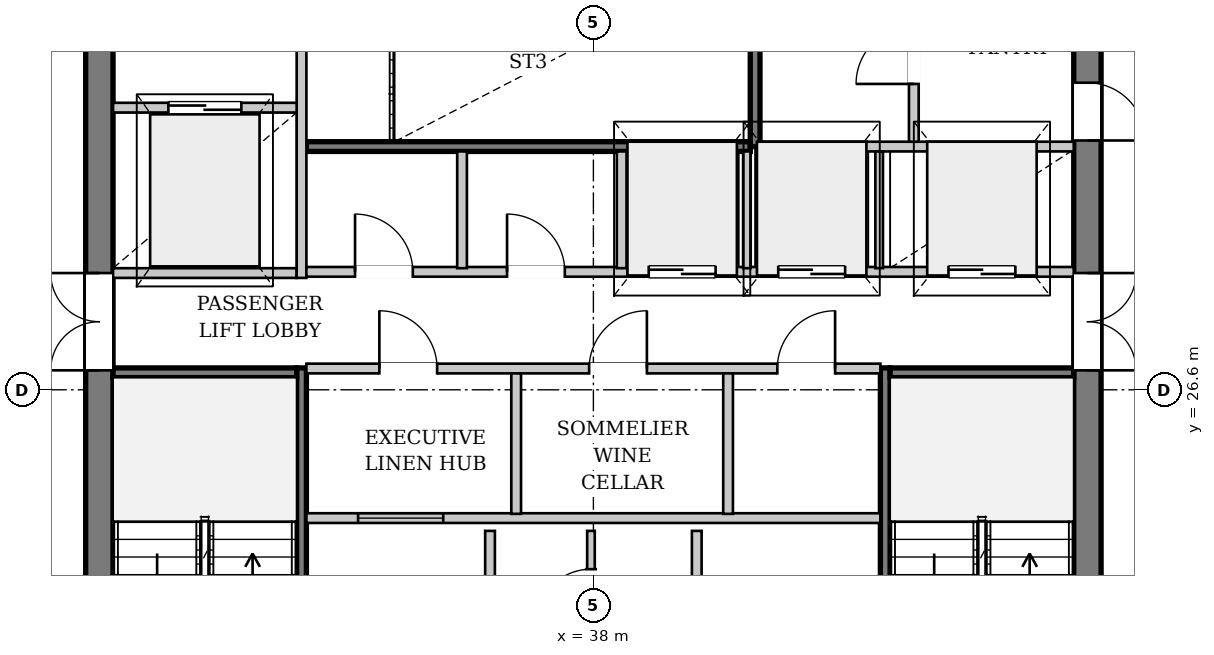
"""IFC4 building model, lengths in metres.
Left out: names, types, materials, properties, quantities, classifications, styles, units other than length and angle.
Written with IfcOpenShell. Run it as: python <this file> out.ifc"""

import sys

from ifc_helpers import new_model, si_unit, direction, frame, frame_2d, origin, place, context, subcontext, project, spatial, rectangle, extrude, source, transform, mapped, element, fill, save


model = new_model("IFC4")
c1 = context("Model", 3, precision=1e-05, world=origin(), true_north=direction((0.0, 1.0)))
c2 = subcontext(c1, "Body", "Model", "MODEL_VIEW")
j1 = project(units=[si_unit("LENGTHUNIT", "METRE"), si_unit("PLANEANGLEUNIT", "RADIAN")], contexts=[c1])
p1 = place(None, origin())
s1 = spatial("IfcSite", under=j1, at=p1, CompositionType="ELEMENT")
p2 = place(p1, origin())
s2 = spatial("IfcBuilding", under=s1, at=p2, CompositionType="ELEMENT")
p3 = place(p2, frame((0.0, 0.0, 290.5)))
s3 = spatial("IfcBuildingStorey", under=s2, at=p3, CompositionType="ELEMENT", Elevation=290.5)
p4 = place(p3, frame((29.875, 19.5, 0.0), z_axis=(0.0, 0.0, 1.0), x_axis=(0.0, 1.0, 0.0)))
e1 = element("IfcWall", 1, at=p4, inside=s3, PredefinedType="SHEAR", context=c2, shape_type="SweptSolid", body=[
    extrude(rectangle(XDim=14.2, YDim=0.45, at=frame_2d((7.1, 0.0))), origin(), (0.0, 0.0, 1.0), 4.24),
])
p5 = place(p4, frame((7.42, 0.0, 0.0)))
e2 = element("IfcOpeningElement", 2, at=p5, cuts=e1, PredefinedType="OPENING", context=c2, shape_type="SweptSolid", body=[
    extrude(rectangle(XDim=1.6, YDim=2.2, at=frame_2d((0.8, 1.1))), frame((0.0, 0.235, 0.0), z_axis=(0.0, -1.0, 0.0), x_axis=(1.0, 0.0, 0.0)), (0.0, 0.0, 1.0), 0.47),
])
p6 = place(p3, frame((46.125, 33.7, 0.0), z_axis=(0.0, 0.0, 1.0), x_axis=(0.0, -1.0, 0.0)))
e3 = element("IfcWall", 3, at=p6, inside=s3, PredefinedType="SHEAR", context=c2, shape_type="SweptSolid", body=[
    extrude(rectangle(XDim=14.2, YDim=0.45, at=frame_2d((7.1, 0.0))), origin(), (0.0, 0.0, 1.0), 4.24),
])
p7 = place(p6, frame((5.18, 0.0, 0.0)))
e4 = element("IfcOpeningElement", 4, at=p7, cuts=e3, PredefinedType="OPENING", context=c2, shape_type="SweptSolid", body=[
    extrude(rectangle(XDim=1.6, YDim=2.2, at=frame_2d((0.8, 1.1))), frame((0.0, 0.235, 0.0), z_axis=(0.0, -1.0, 0.0), x_axis=(1.0, 0.0, 0.0)), (0.0, 0.0, 1.0), 0.47),
])
p8 = place(p6, frame((2.05, 0.0, 0.0)))
e5 = element("IfcOpeningElement", 5, at=p8, cuts=e3, PredefinedType="OPENING", context=c2, shape_type="SweptSolid", body=[
    extrude(rectangle(XDim=0.95, YDim=2.1, at=frame_2d((0.475, 1.05))), frame((0.0, 0.235, 0.0), z_axis=(0.0, -1.0, 0.0), x_axis=(1.0, 0.0, 0.0)), (0.0, 0.0, 1.0), 0.47),
])
p9 = place(p3, frame((33.2, 19.5, 0.0), z_axis=(0.0, 0.0, 1.0), x_axis=(0.0, 1.0, 0.0)))
e6 = element("IfcWall", 6, at=p9, inside=s3, PredefinedType="PARTITIONING", context=c2, shape_type="SweptSolid", body=[
    extrude(rectangle(XDim=7.46, YDim=0.16, at=frame_2d((3.73, 0.0))), origin(), (0.0, 0.0, 1.0), 4.24),
])
p10 = place(p9, frame((0.08, 0.0, 0.0)))
e7 = element("IfcOpeningElement", 7, at=p10, cuts=e6, PredefinedType="OPENING", context=c2, shape_type="SweptSolid", body=[
    extrude(rectangle(XDim=1.32, YDim=2.2, at=frame_2d((0.66, 1.1))), frame((0.0, 0.09, 0.0), z_axis=(0.0, -1.0, 0.0), x_axis=(1.0, 0.0, 0.0)), (0.0, 0.0, 1.0), 0.18),
])
p11 = place(p3, frame((30.1, 26.88, 0.0), z_axis=(0.0, 0.0, 1.0), x_axis=(1.0, 0.0, 0.0)))
e8 = element("IfcWall", 8, at=p11, inside=s3, PredefinedType="PARTITIONING", context=c2, shape_type="SweptSolid", body=[
    extrude(rectangle(XDim=3.02, YDim=0.16, at=frame_2d((1.51, 0.0))), origin(), (0.0, 0.0, 1.0), 4.24),
])
p12 = place(p3, frame((42.8, 26.96, 0.0), z_axis=(0.0, 0.0, 1.0), x_axis=(0.0, -1.0, 0.0)))
e9 = element("IfcWall", 9, at=p12, inside=s3, PredefinedType="PARTITIONING", context=c2, shape_type="SweptSolid", body=[
    extrude(rectangle(XDim=7.46, YDim=0.16, at=frame_2d((3.73, 0.0))), origin(), (0.0, 0.0, 1.0), 4.24),
])
p13 = place(p12, frame((6.06, 0.0, 0.0)))
e10 = element("IfcOpeningElement", 10, at=p13, cuts=e9, PredefinedType="OPENING", context=c2, shape_type="SweptSolid", body=[
    extrude(rectangle(XDim=1.32, YDim=2.2, at=frame_2d((0.66, 1.1))), frame((0.0, 0.09, 0.0), z_axis=(0.0, -1.0, 0.0), x_axis=(1.0, 0.0, 0.0)), (0.0, 0.0, 1.0), 0.18),
])
p14 = place(p3, frame((42.88, 26.88, 0.0), z_axis=(0.0, 0.0, 1.0), x_axis=(1.0, 0.0, 0.0)))
e11 = element("IfcWall", 11, at=p14, inside=s3, PredefinedType="PARTITIONING", context=c2, shape_type="SweptSolid", body=[
    extrude(rectangle(XDim=3.02, YDim=0.16, at=frame_2d((1.51, 0.0))), origin(), (0.0, 0.0, 1.0), 4.24),
])
p15 = place(p3, frame((33.28, 30.6, 0.0), z_axis=(0.0, 0.0, 1.0), x_axis=(1.0, 0.0, 0.0)))
e12 = element("IfcWall", 12, at=p15, inside=s3, PredefinedType="PARTITIONING", context=c2, shape_type="SweptSolid", body=[
    extrude(rectangle(XDim=7.3, YDim=0.16, at=frame_2d((3.65, 0.0))), origin(), (0.0, 0.0, 1.0), 4.24),
])
p16 = place(p3, frame((40.66, 30.6, 0.0), z_axis=(0.0, 0.0, 1.0), x_axis=(0.0, 1.0, 0.0)))
e13 = element("IfcWall", 13, at=p16, inside=s3, PredefinedType="PARTITIONING", context=c2, shape_type="SweptSolid", body=[
    extrude(rectangle(XDim=3.1, YDim=0.16, at=frame_2d((1.55, 0.0))), origin(), (0.0, 0.0, 1.0), 4.24),
])
p17 = place(p3, frame((36.3, 19.5, 0.0), z_axis=(0.0, 0.0, 1.0), x_axis=(0.0, 1.0, 0.0)))
e14 = element("IfcWall", 14, at=p17, inside=s3, PredefinedType="PARTITIONING", context=c2, shape_type="SweptSolid", body=[
    extrude(rectangle(XDim=4.78, YDim=0.16, at=frame_2d((2.39, 0.0))), origin(), (0.0, 0.0, 1.0), 4.24),
])
p18 = place(p17, frame((0.6, 0.0, 0.0)))
e15 = element("IfcOpeningElement", 15, at=p18, cuts=e14, PredefinedType="OPENING", context=c2, shape_type="SweptSolid", body=[
    extrude(rectangle(XDim=1.2, YDim=2.2, at=frame_2d((0.6, 1.1))), frame((0.0, 0.09, 0.0), z_axis=(0.0, -1.0, 0.0), x_axis=(1.0, 0.0, 0.0)), (0.0, 0.0, 1.0), 0.18),
])
p19 = place(p17, frame((2.65, 0.0, 0.0)))
e16 = element("IfcOpeningElement", 16, at=p19, cuts=e14, PredefinedType="OPENING", context=c2, shape_type="SweptSolid", body=[
    extrude(rectangle(XDim=0.95, YDim=2.1, at=frame_2d((0.475, 1.05))), frame((0.0, 0.09, 0.0), z_axis=(0.0, -1.0, 0.0), x_axis=(1.0, 0.0, 0.0)), (0.0, 0.0, 1.0), 0.18),
])
p20 = place(p3, frame((39.7, 24.28, 0.0), z_axis=(0.0, 0.0, 1.0), x_axis=(0.0, -1.0, 0.0)))
e17 = element("IfcWall", 17, at=p20, inside=s3, PredefinedType="PARTITIONING", context=c2, shape_type="SweptSolid", body=[
    extrude(rectangle(XDim=4.78, YDim=0.16, at=frame_2d((2.39, 0.0))), origin(), (0.0, 0.0, 1.0), 4.24),
])
p21 = place(p20, frame((3.12, 0.0, 0.0)))
e18 = element("IfcOpeningElement", 18, at=p21, cuts=e17, PredefinedType="OPENING", context=c2, shape_type="SweptSolid", body=[
    extrude(rectangle(XDim=1.2, YDim=2.2, at=frame_2d((0.6, 1.1))), frame((0.0, 0.09, 0.0), z_axis=(0.0, -1.0, 0.0), x_axis=(1.0, 0.0, 0.0)), (0.0, 0.0, 1.0), 0.18),
])
p22 = place(p3, frame((33.28, 24.49, 0.0), z_axis=(0.0, 0.0, 1.0), x_axis=(1.0, 0.0, 0.0)))
e19 = element("IfcWall", 19, at=p22, inside=s3, PredefinedType="PARTITIONING", context=c2, shape_type="SweptSolid", body=[
    extrude(rectangle(XDim=9.44, YDim=0.16, at=frame_2d((4.72, 0.0))), origin(), (0.0, 0.0, 1.0), 4.24),
])
p23 = place(p22, frame((0.85, 0.0, 0.95)))
e20 = element("IfcOpeningElement", 20, at=p23, cuts=e19, PredefinedType="OPENING", context=c2, shape_type="SweptSolid", body=[
    extrude(rectangle(XDim=1.4, YDim=1.8, at=frame_2d((0.7, 0.9))), frame((0.0, 0.09, 0.0), z_axis=(0.0, -1.0, 0.0), x_axis=(1.0, 0.0, 0.0)), (0.0, 0.0, 1.0), 0.18),
])
p24 = place(p3, frame((37.96, 22.1, 0.0), z_axis=(0.0, 0.0, 1.0), x_axis=(0.0, 1.0, 0.0)))
e21 = element("IfcWall", 21, at=p24, inside=s3, PredefinedType="PARTITIONING", context=c2, shape_type="SweptSolid", body=[
    extrude(rectangle(XDim=2.18, YDim=0.125, at=frame_2d((1.09, 0.0))), origin(), (0.0, 0.0, 1.0), 4.24),
])
p25 = place(p24, frame((0.65, 0.0, 0.0)))
e22 = element("IfcOpeningElement", 22, at=p25, cuts=e21, PredefinedType="OPENING", context=c2, shape_type="SweptSolid", body=[
    extrude(rectangle(XDim=0.9, YDim=2.1, at=frame_2d((0.45, 1.05))), frame((0.0, 0.073, 0.0), z_axis=(0.0, -1.0, 0.0), x_axis=(1.0, 0.0, 0.0)), (0.0, 0.0, 1.0), 0.145),
])
p26 = place(p3, frame((30.1, 28.52, 0.0), z_axis=(0.0, 0.0, 1.0), x_axis=(1.0, 0.0, 0.0)))
e23 = element("IfcWall", 23, at=p26, inside=s3, PredefinedType="PARTITIONING", context=c2, shape_type="SweptSolid", body=[
    extrude(rectangle(XDim=3.02, YDim=0.16, at=frame_2d((1.51, 0.0))), origin(), (0.0, 0.0, 1.0), 4.24),
])
p27 = place(p3, frame((33.2, 28.44, 0.0), z_axis=(0.0, 0.0, 1.0), x_axis=(0.0, 1.0, 0.0)))
e24 = element("IfcWall", 24, at=p27, inside=s3, PredefinedType="PARTITIONING", context=c2, shape_type="SweptSolid", body=[
    extrude(rectangle(XDim=5.26, YDim=0.16, at=frame_2d((2.63, 0.0))), origin(), (0.0, 0.0, 1.0), 4.24),
])
p28 = place(p3, frame((30.1, 31.24, 0.0), z_axis=(0.0, 0.0, 1.0), x_axis=(1.0, 0.0, 0.0)))
e25 = element("IfcWall", 25, at=p28, inside=s3, PredefinedType="PARTITIONING", context=c2, shape_type="SweptSolid", body=[
    extrude(rectangle(XDim=3.02, YDim=0.16, at=frame_2d((1.51, 0.0))), origin(), (0.0, 0.0, 1.0), 4.24),
])
p29 = place(p28, frame((0.91, 0.0, 0.0)))
e26 = element("IfcOpeningElement", 26, at=p29, cuts=e25, PredefinedType="OPENING", context=c2, shape_type="SweptSolid", body=[
    extrude(rectangle(XDim=1.2, YDim=2.2, at=frame_2d((0.6, 1.1))), frame((0.0, 0.09, 0.0), z_axis=(0.0, -1.0, 0.0), x_axis=(1.0, 0.0, 0.0)), (0.0, 0.0, 1.0), 0.18),
])
p30 = place(p3, frame((33.28, 26.95, 0.0), z_axis=(0.0, 0.0, 1.0), x_axis=(1.0, 0.0, 0.0)))
e27 = element("IfcWall", 27, at=p30, inside=s3, PredefinedType="PARTITIONING", context=c2, shape_type="SweptSolid", body=[
    extrude(rectangle(XDim=9.44, YDim=0.16, at=frame_2d((4.72, 0.0))), origin(), (0.0, 0.0, 1.0), 4.24),
])
p31 = place(p30, frame((1.2, 0.0, 0.0)))
e28 = element("IfcOpeningElement", 28, at=p31, cuts=e27, PredefinedType="OPENING", context=c2, shape_type="SweptSolid", body=[
    extrude(rectangle(XDim=0.95, YDim=2.1, at=frame_2d((0.475, 1.05))), frame((0.0, 0.09, 0.0), z_axis=(0.0, -1.0, 0.0), x_axis=(1.0, 0.0, 0.0)), (0.0, 0.0, 1.0), 0.18),
])
p32 = place(p30, frame((4.65, 0.0, 0.0)))
e29 = element("IfcOpeningElement", 29, at=p32, cuts=e27, PredefinedType="OPENING", context=c2, shape_type="SweptSolid", body=[
    extrude(rectangle(XDim=0.95, YDim=2.1, at=frame_2d((0.475, 1.05))), frame((0.0, 0.09, 0.0), z_axis=(0.0, -1.0, 0.0), x_axis=(1.0, 0.0, 0.0)), (0.0, 0.0, 1.0), 0.18),
])
p33 = place(p30, frame((7.745, 0.0, 0.0)))
e30 = element("IfcOpeningElement", 30, at=p33, cuts=e27, PredefinedType="OPENING", context=c2, shape_type="SweptSolid", body=[
    extrude(rectangle(XDim=0.95, YDim=2.1, at=frame_2d((0.475, 1.05))), frame((0.0, 0.09, 0.0), z_axis=(0.0, -1.0, 0.0), x_axis=(1.0, 0.0, 0.0)), (0.0, 0.0, 1.0), 0.18),
])
for number, where, z_axis, x_axis in (
    (31, (36.73, 24.56, 0.0), (0.0, 0.0, 1.0), (0.0, 1.0, 0.0)),
    (32, (40.215, 24.56, 0.0), (0.0, 0.0, 1.0), (0.0, 1.0, 0.0)),
):
    element("IfcWall", number, at=place(p3, frame(where, z_axis=z_axis, x_axis=x_axis)), inside=s3, PredefinedType="PARTITIONING", context=c2, shape_type="SweptSolid", body=[
        extrude(rectangle(XDim=2.31, YDim=0.16, at=frame_2d((1.155, 0.0))), origin(), (0.0, 0.0, 1.0), 4.24),
    ])
p34 = place(p3, frame((33.28, 28.54, 0.0), z_axis=(0.0, 0.0, 1.0), x_axis=(1.0, 0.0, 0.0)))
e33 = element("IfcWall", 33, at=p34, inside=s3, PredefinedType="PARTITIONING", context=c2, shape_type="SweptSolid", body=[
    extrude(rectangle(XDim=12.62, YDim=0.16, at=frame_2d((6.31, 0.0))), origin(), (0.0, 0.0, 1.0), 4.24),
])
p35 = place(p34, frame((0.8, 0.0, 0.0)))
e34 = element("IfcOpeningElement", 34, at=p35, cuts=e33, PredefinedType="OPENING", context=c2, shape_type="SweptSolid", body=[
    extrude(rectangle(XDim=0.95, YDim=2.1, at=frame_2d((0.475, 1.05))), frame((0.0, 0.09, 0.0), z_axis=(0.0, -1.0, 0.0), x_axis=(1.0, 0.0, 0.0)), (0.0, 0.0, 1.0), 0.18),
])
p36 = place(p34, frame((3.3, 0.0, 0.0)))
e35 = element("IfcOpeningElement", 35, at=p36, cuts=e33, PredefinedType="OPENING", context=c2, shape_type="SweptSolid", body=[
    extrude(rectangle(XDim=0.95, YDim=2.1, at=frame_2d((0.475, 1.05))), frame((0.0, 0.09, 0.0), z_axis=(0.0, -1.0, 0.0), x_axis=(1.0, 0.0, 0.0)), (0.0, 0.0, 1.0), 0.18),
])
p37 = place(p34, frame((5.63, 0.0, 0.0)))
e36 = element("IfcOpeningElement", 36, at=p37, cuts=e33, PredefinedType="OPENING", context=c2, shape_type="SweptSolid", body=[
    extrude(rectangle(XDim=1.1, YDim=2.2, at=frame_2d((0.55, 1.1))), frame((0.0, 0.09, 0.0), z_axis=(0.0, -1.0, 0.0), x_axis=(1.0, 0.0, 0.0)), (0.0, 0.0, 1.0), 0.18),
])
p38 = place(p34, frame((7.76, 0.0, 0.0)))
e37 = element("IfcOpeningElement", 37, at=p38, cuts=e33, PredefinedType="OPENING", context=c2, shape_type="SweptSolid", body=[
    extrude(rectangle(XDim=1.1, YDim=2.2, at=frame_2d((0.55, 1.1))), frame((0.0, 0.09, 0.0), z_axis=(0.0, -1.0, 0.0), x_axis=(1.0, 0.0, 0.0)), (0.0, 0.0, 1.0), 0.18),
])
p39 = place(p34, frame((10.56, 0.0, 0.0)))
e38 = element("IfcOpeningElement", 38, at=p39, cuts=e33, PredefinedType="OPENING", context=c2, shape_type="SweptSolid", body=[
    extrude(rectangle(XDim=1.1, YDim=2.2, at=frame_2d((0.55, 1.1))), frame((0.0, 0.09, 0.0), z_axis=(0.0, -1.0, 0.0), x_axis=(1.0, 0.0, 0.0)), (0.0, 0.0, 1.0), 0.18),
])
p40 = place(p3, frame((40.72, 30.6, 0.0), z_axis=(0.0, 0.0, 1.0), x_axis=(1.0, 0.0, 0.0)))
e39 = element("IfcWall", 39, at=p40, inside=s3, PredefinedType="PARTITIONING", context=c2, shape_type="SweptSolid", body=[
    extrude(rectangle(XDim=5.18, YDim=0.16, at=frame_2d((2.59, 0.0))), origin(), (0.0, 0.0, 1.0), 4.24),
])
for number, where, z_axis, x_axis in (
    (40, (35.84, 28.6, 0.0), (0.0, 0.0, 1.0), (0.0, 1.0, 0.0)),
    (41, (38.465, 28.6, 0.0), (0.0, 0.0, 1.0), (0.0, 1.0, 0.0)),
):
    element("IfcWall", number, at=place(p3, frame(where, z_axis=z_axis, x_axis=x_axis)), inside=s3, PredefinedType="PARTITIONING", context=c2, shape_type="SweptSolid", body=[
        extrude(rectangle(XDim=1.92, YDim=0.16, at=frame_2d((0.96, 0.0))), origin(), (0.0, 0.0, 1.0), 4.24),
    ])
for number, where, z_axis, x_axis in (
    (42, (40.525, 28.6, 0.0), (0.0, 0.0, 1.0), (0.0, 1.0, 0.0)),
    (43, (42.7, 28.6, 0.0), (0.0, 0.0, 1.0), (0.0, 1.0, 0.0)),
):
    element("IfcWall", number, at=place(p3, frame(where, z_axis=z_axis, x_axis=x_axis)), inside=s3, PredefinedType="PARTITIONING", context=c2, shape_type="SweptSolid", body=[
        extrude(rectangle(XDim=1.92, YDim=0.125, at=frame_2d((0.96, 0.0))), origin(), (0.0, 0.0, 1.0), 4.24),
    ])
p41 = place(p3, frame((43.27, 30.68, 0.0), z_axis=(0.0, 0.0, 1.0), x_axis=(0.0, 1.0, 0.0)))
e44 = element("IfcWall", 44, at=p41, inside=s3, PredefinedType="PARTITIONING", context=c2, shape_type="SweptSolid", body=[
    extrude(rectangle(XDim=3.02, YDim=0.16, at=frame_2d((1.51, 0.0))), origin(), (0.0, 0.0, 1.0), 4.24),
])
p42 = place(p41, frame((0.95, 0.0, 0.0)))
e45 = element("IfcOpeningElement", 45, at=p42, cuts=e44, PredefinedType="OPENING", context=c2, shape_type="SweptSolid", body=[
    extrude(rectangle(XDim=0.95, YDim=2.1, at=frame_2d((0.475, 1.05))), frame((0.0, 0.09, 0.0), z_axis=(0.0, -1.0, 0.0), x_axis=(1.0, 0.0, 0.0)), (0.0, 0.0, 1.0), 0.18),
])
m1 = source(origin(), c2, "Body", "SweptSolid", [
    extrude(rectangle(XDim=1.6, YDim=2.2, at=frame_2d((0.8, 1.1))), frame((0.0, 0.025, 0.0), z_axis=(0.0, -1.0, 0.0), x_axis=(1.0, 0.0, 0.0)), (0.0, 0.0, 1.0), 0.05),
])
p43 = place(p5, origin())
e46 = element("IfcDoor", 46, at=p43, inside=s3, OperationType="DOUBLE_DOOR_SINGLE_SWING", PredefinedType="DOOR", context=c2, shape_type="MappedRepresentation", body=[
    mapped(m1, transform((0.0, 0.0, 0.0), x_axis=(1.0, 0.0, 0.0), y_axis=(0.0, 1.0, 0.0), z_axis=(0.0, 0.0, 1.0), scale=1.0)),
])
fill(e2, e46)
p44 = place(p7, origin())
e47 = element("IfcDoor", 47, at=p44, inside=s3, OperationType="DOUBLE_DOOR_SINGLE_SWING", PredefinedType="DOOR", context=c2, shape_type="MappedRepresentation", body=[
    mapped(m1, transform((0.0, 0.0, 0.0), x_axis=(1.0, 0.0, 0.0), y_axis=(0.0, 1.0, 0.0), z_axis=(0.0, 0.0, 1.0), scale=1.0)),
])
fill(e4, e47)
m2 = source(origin(), c2, "Body", "SweptSolid", [
    extrude(rectangle(XDim=0.9, YDim=2.1, at=frame_2d((0.45, 1.05))), frame((0.0, 0.025, 0.0), z_axis=(0.0, -1.0, 0.0), x_axis=(1.0, 0.0, 0.0)), (0.0, 0.0, 1.0), 0.05),
])
p45 = place(p25, origin())
e48 = element("IfcDoor", 48, at=p45, inside=s3, OperationType="SINGLE_SWING_LEFT", PredefinedType="DOOR", context=c2, shape_type="MappedRepresentation", body=[
    mapped(m2, transform((0.0, 0.0, 0.0), x_axis=(1.0, 0.0, 0.0), y_axis=(0.0, 1.0, 0.0), z_axis=(0.0, 0.0, 1.0), scale=1.0)),
])
fill(e22, e48)
m3 = source(origin(), c2, "Body", "SweptSolid", [
    extrude(rectangle(XDim=1.2, YDim=2.2, at=frame_2d((0.6, 1.1))), frame((0.0, 0.025, 0.0), z_axis=(0.0, -1.0, 0.0), x_axis=(1.0, 0.0, 0.0)), (0.0, 0.0, 1.0), 0.05),
])
p46 = place(p29, origin())
e49 = element("IfcDoor", 49, at=p46, inside=s3, OperationType="DOUBLE_DOOR_SLIDING", PredefinedType="DOOR", context=c2, shape_type="MappedRepresentation", body=[
    mapped(m3, transform((0.0, 0.0, 0.0), x_axis=(1.0, 0.0, 0.0), y_axis=(0.0, 1.0, 0.0), z_axis=(0.0, 0.0, 1.0), scale=1.0)),
])
fill(e26, e49)
m4 = source(origin(), c2, "Body", "SweptSolid", [
    extrude(rectangle(XDim=0.95, YDim=2.1, at=frame_2d((0.475, 1.05))), frame((0.0, 0.025, 0.0), z_axis=(0.0, -1.0, 0.0), x_axis=(1.0, 0.0, 0.0)), (0.0, 0.0, 1.0), 0.05),
])
p47 = place(p31, origin())
e50 = element("IfcDoor", 50, at=p47, inside=s3, OperationType="SINGLE_SWING_LEFT", PredefinedType="DOOR", context=c2, shape_type="MappedRepresentation", body=[
    mapped(m4, transform((0.0, 0.0, 0.0), x_axis=(1.0, 0.0, 0.0), y_axis=(0.0, 1.0, 0.0), z_axis=(0.0, 0.0, 1.0), scale=1.0)),
])
fill(e28, e50)
p48 = place(p32, origin())
e51 = element("IfcDoor", 51, at=p48, inside=s3, OperationType="SINGLE_SWING_RIGHT", PredefinedType="DOOR", context=c2, shape_type="MappedRepresentation", body=[
    mapped(m4, transform((0.0, 0.0, 0.0), x_axis=(1.0, 0.0, 0.0), y_axis=(0.0, 1.0, 0.0), z_axis=(0.0, 0.0, 1.0), scale=1.0)),
])
fill(e29, e51)
p49 = place(p33, origin())
e52 = element("IfcDoor", 52, at=p49, inside=s3, OperationType="SINGLE_SWING_RIGHT", PredefinedType="DOOR", context=c2, shape_type="MappedRepresentation", body=[
    mapped(m4, transform((0.0, 0.0, 0.0), x_axis=(1.0, 0.0, 0.0), y_axis=(0.0, 1.0, 0.0), z_axis=(0.0, 0.0, 1.0), scale=1.0)),
])
fill(e30, e52)
p50 = place(p35, origin())
e53 = element("IfcDoor", 53, at=p50, inside=s3, OperationType="SINGLE_SWING_LEFT", PredefinedType="DOOR", context=c2, shape_type="MappedRepresentation", body=[
    mapped(m4, transform((0.0, 0.0, 0.0), x_axis=(1.0, 0.0, 0.0), y_axis=(0.0, 1.0, 0.0), z_axis=(0.0, 0.0, 1.0), scale=1.0)),
])
fill(e34, e53)
p51 = place(p36, origin())
e54 = element("IfcDoor", 54, at=p51, inside=s3, OperationType="SINGLE_SWING_LEFT", PredefinedType="DOOR", context=c2, shape_type="MappedRepresentation", body=[
    mapped(m4, transform((0.0, 0.0, 0.0), x_axis=(1.0, 0.0, 0.0), y_axis=(0.0, 1.0, 0.0), z_axis=(0.0, 0.0, 1.0), scale=1.0)),
])
fill(e35, e54)
m5 = source(origin(), c2, "Body", "SweptSolid", [
    extrude(rectangle(XDim=1.1, YDim=2.2, at=frame_2d((0.55, 1.1))), frame((0.0, 0.025, 0.0), z_axis=(0.0, -1.0, 0.0), x_axis=(1.0, 0.0, 0.0)), (0.0, 0.0, 1.0), 0.05),
])
p52 = place(p37, origin())
e55 = element("IfcDoor", 55, at=p52, inside=s3, OperationType="DOUBLE_DOOR_SLIDING", PredefinedType="DOOR", context=c2, shape_type="MappedRepresentation", body=[
    mapped(m5, transform((0.0, 0.0, 0.0), x_axis=(1.0, 0.0, 0.0), y_axis=(0.0, 1.0, 0.0), z_axis=(0.0, 0.0, 1.0), scale=1.0)),
])
fill(e36, e55)
p53 = place(p38, origin())
e56 = element("IfcDoor", 56, at=p53, inside=s3, OperationType="DOUBLE_DOOR_SLIDING", PredefinedType="DOOR", context=c2, shape_type="MappedRepresentation", body=[
    mapped(m5, transform((0.0, 0.0, 0.0), x_axis=(1.0, 0.0, 0.0), y_axis=(0.0, 1.0, 0.0), z_axis=(0.0, 0.0, 1.0), scale=1.0)),
])
fill(e37, e56)
p54 = place(p39, origin())
e57 = element("IfcDoor", 57, at=p54, inside=s3, OperationType="DOUBLE_DOOR_SLIDING", PredefinedType="DOOR", context=c2, shape_type="MappedRepresentation", body=[
    mapped(m5, transform((0.0, 0.0, 0.0), x_axis=(1.0, 0.0, 0.0), y_axis=(0.0, 1.0, 0.0), z_axis=(0.0, 0.0, 1.0), scale=1.0)),
])
fill(e38, e57)
p55 = place(p42, origin())
e58 = element("IfcDoor", 58, at=p55, inside=s3, OperationType="SINGLE_SWING_LEFT", PredefinedType="DOOR", context=c2, shape_type="MappedRepresentation", body=[
    mapped(m4, transform((0.0, 0.0, 0.0), x_axis=(1.0, 0.0, 0.0), y_axis=(0.0, 1.0, 0.0), z_axis=(0.0, 0.0, 1.0), scale=1.0)),
])
fill(e45, e58)
p56 = place(p8, origin())
e59 = element("IfcDoor", 59, at=p56, inside=s3, OperationType="SINGLE_SWING_RIGHT", PredefinedType="DOOR", context=c2, shape_type="MappedRepresentation", body=[
    mapped(m4, transform((0.0, 0.0, 0.0), x_axis=(1.0, 0.0, 0.0), y_axis=(0.0, 1.0, 0.0), z_axis=(0.0, 0.0, 1.0), scale=1.0)),
])
fill(e5, e59)
m6 = source(origin(), c2, "Body", "SweptSolid", [
    extrude(rectangle(XDim=1.4, YDim=1.8, at=frame_2d((0.7, 0.9))), frame((0.0, 0.03, 0.0), z_axis=(0.0, -1.0, 0.0), x_axis=(1.0, 0.0, 0.0)), (0.0, 0.0, 1.0), 0.06),
])
p57 = place(p23, origin())
e60 = element("IfcWindow", 60, at=p57, inside=s3, PartitioningType="SINGLE_PANEL", PredefinedType="WINDOW", context=c2, shape_type="MappedRepresentation", body=[
    mapped(m6, transform((0.0, 0.0, 0.0), x_axis=(1.0, 0.0, 0.0), y_axis=(0.0, 1.0, 0.0), z_axis=(0.0, 0.0, 1.0), scale=1.0)),
])
fill(e20, e60)
save(model, sys.argv[1])
